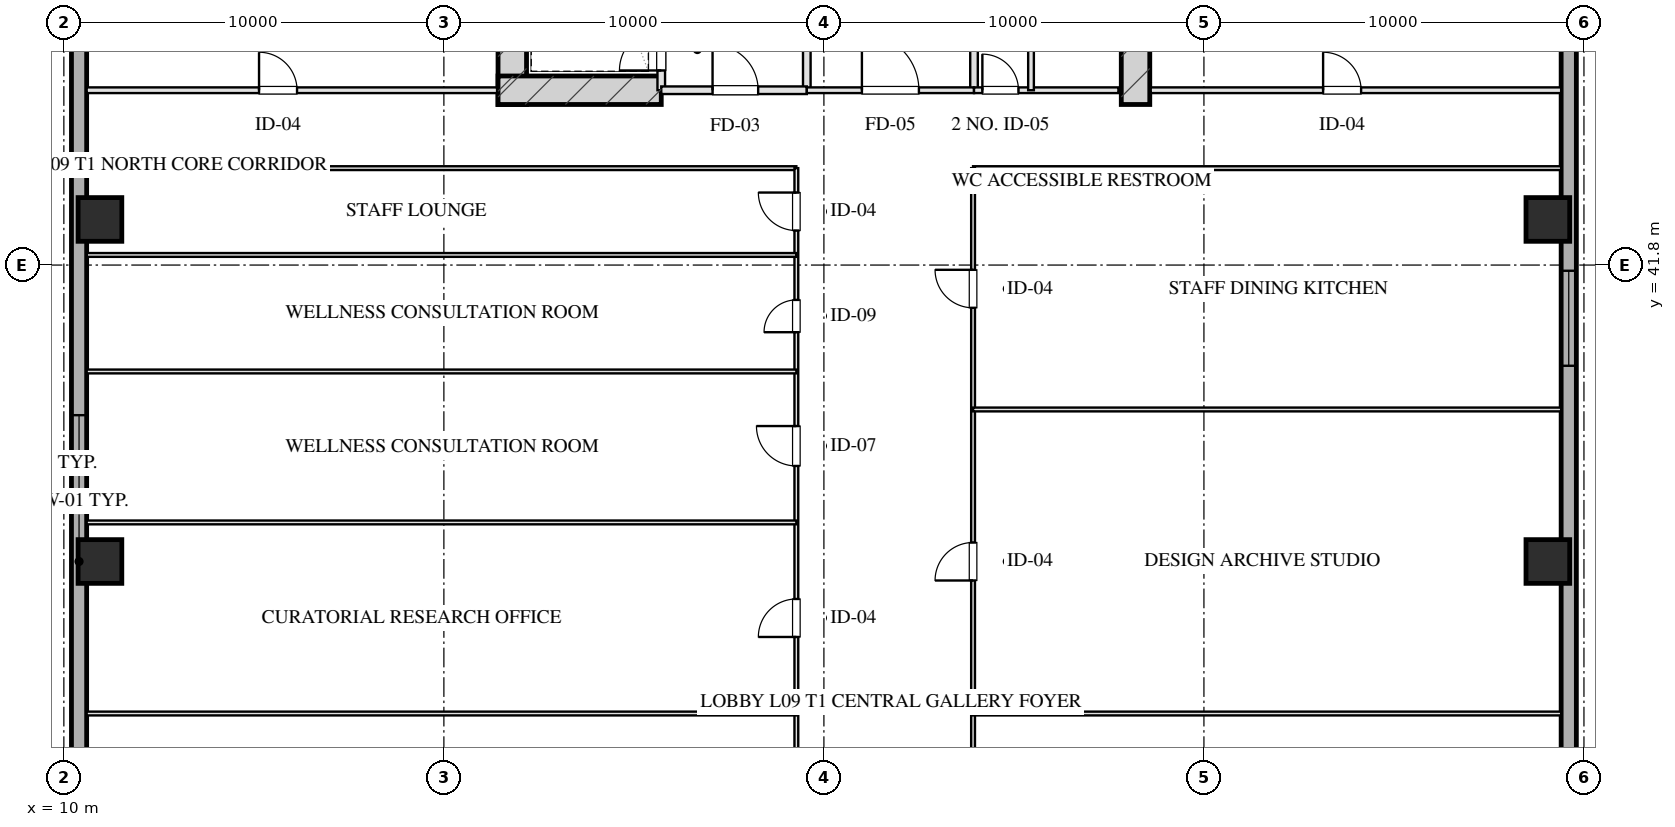
"""IFC4 building model, lengths in metres.
Left out: names, types, materials, properties, quantities, classifications, styles, units other than length and angle.
Written with IfcOpenShell. Run it as: python <this file> out.ifc"""

import sys

from ifc_helpers import new_model, si_unit, direction, frame, frame_2d, origin, origin_2d, place, context, subcontext, project, spatial, rectangle, hollow_rectangle, extrude, element, fill, save


model = new_model("IFC4")
c1 = context("Model", 3, precision=1e-05, world=origin(), true_north=direction((0.0, 1.0)))
c2 = subcontext(c1, "Body", "Model", "MODEL_VIEW")
j1 = project(units=[si_unit("LENGTHUNIT", "METRE"), si_unit("PLANEANGLEUNIT", "RADIAN")], contexts=[c1])
p1 = place(None, origin())
s1 = spatial("IfcSite", under=j1, at=p1, CompositionType="ELEMENT")
p2 = place(p1, origin())
s2 = spatial("IfcBuilding", under=s1, at=p2, CompositionType="ELEMENT")
p3 = place(p2, frame((0.0, 0.0, 42.0)))
s3 = spatial("IfcBuildingStorey", under=s2, at=p3, CompositionType="ELEMENT", Elevation=42.0)
for number, where, z_axis, x_axis in (
    (1, (21.8, 46.025, 0.0), (0.0, 0.0, 1.0), (0.0, 1.0, 0.0)),
    (2, (38.2, 46.025, 0.0), (0.0, 0.0, 1.0), (0.0, 1.0, 0.0)),
):
    element("IfcWall", number, at=place(p3, frame(where, z_axis=z_axis, x_axis=x_axis)), inside=s3, PredefinedType="SHEAR", context=c2, shape_type="SweptSolid", body=[
        extrude(rectangle(XDim=9.63, YDim=0.75, at=frame_2d((4.815, 0.0))), origin(), (0.0, 0.0, 1.0), 4.0),
    ])
p4 = place(p3, frame((21.425, 46.4, 0.0), z_axis=(0.0, 0.0, 1.0), x_axis=(1.0, 0.0, 0.0)))
e3 = element("IfcWall", 3, at=p4, inside=s3, PredefinedType="SHEAR", context=c2, shape_type="SweptSolid", body=[
    extrude(rectangle(XDim=4.295, YDim=0.75, at=frame_2d((2.147, 0.0))), origin(), (0.0, 0.0, 1.0), 4.0),
])
for number, where, z_axis, x_axis in (
    (4, (10.95, 34.0, 0.0), (0.0, 0.0, 1.0), (1.0, 0.0, 0.0)),
    (5, (10.95, 43.0, 0.0), (0.0, 0.0, 1.0), (1.0, 0.0, 0.0)),
    (6, (49.05, 34.0, 0.0), (0.0, 0.0, 1.0), (1.0, 0.0, 0.0)),
    (7, (49.05, 43.0, 0.0), (0.0, 0.0, 1.0), (1.0, 0.0, 0.0)),
):
    element("IfcColumn", number, at=place(p3, frame(where, z_axis=z_axis, x_axis=x_axis)), inside=s3, PredefinedType="COLUMN", context=c2, shape_type="SweptSolid", body=[
        extrude(hollow_rectangle(XDim=1.15, YDim=1.15, WallThickness=0.04, at=origin_2d()), origin(), (0.0, 0.0, 1.0), 4.001),
    ])
p5 = place(p3, frame((10.4, 7.2, 0.0), z_axis=(0.0, 0.0, 1.0), x_axis=(0.0, 1.0, 0.0)))
e8 = element("IfcWall", 8, at=p5, inside=s3, PredefinedType="SOLIDWALL", context=c2, shape_type="SweptSolid", body=[
    extrude(rectangle(XDim=53.6, YDim=0.4, at=frame_2d((26.8, 0.0))), origin(), (0.0, 0.0, 1.0), 3.1),
])
p6 = place(p5, frame((28.15, 0.0, 0.75)))
e9 = element("IfcOpeningElement", 9, at=p6, cuts=e8, PredefinedType="OPENING", context=c2, shape_type="SweptSolid", body=[
    extrude(rectangle(XDim=2.5, YDim=1.75, at=frame_2d((1.25, 0.875))), frame((0.0, 0.21, 0.0), z_axis=(0.0, -1.0, 0.0), x_axis=(1.0, 0.0, 0.0)), (0.0, 0.0, 1.0), 0.42),
])
p7 = place(p3, frame((49.6, 60.8, 0.0), z_axis=(0.0, 0.0, 1.0), x_axis=(0.0, -1.0, 0.0)))
e10 = element("IfcWall", 10, at=p7, inside=s3, PredefinedType="SOLIDWALL", context=c2, shape_type="SweptSolid", body=[
    extrude(rectangle(XDim=53.6, YDim=0.4, at=frame_2d((26.8, 0.0))), origin(), (0.0, 0.0, 1.0), 3.1),
])
p8 = place(p7, frame((31.95, 0.0, 0.75)))
e11 = element("IfcOpeningElement", 11, at=p8, cuts=e10, PredefinedType="OPENING", context=c2, shape_type="SweptSolid", body=[
    extrude(rectangle(XDim=2.5, YDim=1.75, at=frame_2d((1.25, 0.875))), frame((0.0, 0.21, 0.0), z_axis=(0.0, -1.0, 0.0), x_axis=(1.0, 0.0, 0.0)), (0.0, 0.0, 1.0), 0.42),
])
p9 = place(p7, frame((19.15, 0.0, 0.75)))
e12 = element("IfcOpeningElement", 12, at=p9, cuts=e10, PredefinedType="OPENING", context=c2, shape_type="SweptSolid", body=[
    extrude(rectangle(XDim=2.5, YDim=1.75, at=frame_2d((1.25, 0.875))), frame((0.0, 0.21, 0.0), z_axis=(0.0, -1.0, 0.0), x_axis=(1.0, 0.0, 0.0)), (0.0, 0.0, 1.0), 0.42),
])
p10 = place(p3, frame((25.72, 46.4, 0.0), z_axis=(0.0, 0.0, 1.0), x_axis=(0.0, 1.0, 0.0)))
e13 = element("IfcWall", 13, at=p10, inside=s3, PredefinedType="PARTITIONING", context=c2, shape_type="SweptSolid", body=[
    extrude(rectangle(XDim=1.9, YDim=0.2, at=frame_2d((0.95, 0.0))), origin(), (0.0, 0.0, 1.0), 3.705),
])
p11 = place(p10, frame((0.52, 0.0, 0.0)))
e14 = element("IfcOpeningElement", 14, at=p11, cuts=e13, PredefinedType="OPENING", context=c2, shape_type="SweptSolid", body=[
    extrude(rectangle(XDim=1.1, YDim=2.05, at=frame_2d((0.55, 1.025))), frame((0.0, 0.11, 0.0), z_axis=(0.0, -1.0, 0.0), x_axis=(1.0, 0.0, 0.0)), (0.0, 0.0, 1.0), 0.22),
])
p12 = place(p3, frame((29.55, 46.4, 0.0), z_axis=(0.0, 0.0, 1.0), x_axis=(0.0, 1.0, 0.0)))
e15 = element("IfcWall", 15, at=p12, inside=s3, PredefinedType="PARTITIONING", context=c2, shape_type="SweptSolid", body=[
    extrude(rectangle(XDim=8.43, YDim=0.2, at=frame_2d((4.215, 0.0))), origin(), (0.0, 0.0, 1.0), 3.705),
])
p13 = place(p3, frame((25.72, 46.4, 0.0), z_axis=(0.0, 0.0, 1.0), x_axis=(1.0, 0.0, 0.0)))
e16 = element("IfcWall", 16, at=p13, inside=s3, PredefinedType="PARTITIONING", context=c2, shape_type="SweptSolid", body=[
    extrude(rectangle(XDim=3.83, YDim=0.2, at=frame_2d((1.915, 0.0))), origin(), (0.0, 0.0, 1.0), 3.705),
])
p14 = place(p13, frame((1.35, 0.0, 0.0)))
e17 = element("IfcOpeningElement", 17, at=p14, cuts=e16, PredefinedType="OPENING", context=c2, shape_type="SweptSolid", body=[
    extrude(rectangle(XDim=1.2, YDim=2.05, at=frame_2d((0.6, 1.025))), frame((0.0, 0.11, 0.0), z_axis=(0.0, -1.0, 0.0), x_axis=(1.0, 0.0, 0.0)), (0.0, 0.0, 1.0), 0.22),
])
p15 = place(p3, frame((33.95, 46.4, 0.0), z_axis=(0.0, 0.0, 1.0), x_axis=(0.0, 1.0, 0.0)))
e18 = element("IfcWall", 18, at=p15, inside=s3, PredefinedType="PARTITIONING", context=c2, shape_type="SweptSolid", body=[
    extrude(rectangle(XDim=8.43, YDim=0.2, at=frame_2d((4.215, 0.0))), origin(), (0.0, 0.0, 1.0), 3.705),
])
p16 = place(p3, frame((29.55, 46.4, 0.0), z_axis=(0.0, 0.0, 1.0), x_axis=(1.0, 0.0, 0.0)))
e19 = element("IfcWall", 19, at=p16, inside=s3, PredefinedType="PARTITIONING", context=c2, shape_type="SweptSolid", body=[
    extrude(rectangle(XDim=4.4, YDim=0.15, at=frame_2d((2.2, 0.0))), origin(), (0.0, 0.0, 1.0), 3.705),
])
p17 = place(p16, frame((1.45, 0.0, 0.0)))
e20 = element("IfcOpeningElement", 20, at=p17, cuts=e19, PredefinedType="OPENING", context=c2, shape_type="SweptSolid", body=[
    extrude(rectangle(XDim=1.5, YDim=2.05, at=frame_2d((0.75, 1.025))), frame((0.0, 0.085, 0.0), z_axis=(0.0, -1.0, 0.0), x_axis=(1.0, 0.0, 0.0)), (0.0, 0.0, 1.0), 0.17),
])
p18 = place(p3, frame((33.95, 46.4, 0.0), z_axis=(0.0, 0.0, 1.0), x_axis=(1.0, 0.0, 0.0)))
e21 = element("IfcWall", 21, at=p18, inside=s3, PredefinedType="PARTITIONING", context=c2, shape_type="SweptSolid", body=[
    extrude(rectangle(XDim=3.8, YDim=0.15, at=frame_2d((1.9, 0.0))), origin(), (0.0, 0.0, 1.0), 3.705),
])
p19 = place(p18, frame((0.22, 0.0, 0.0)))
e22 = element("IfcOpeningElement", 22, at=p19, cuts=e21, PredefinedType="OPENING", context=c2, shape_type="SweptSolid", body=[
    extrude(rectangle(XDim=0.95, YDim=2.05, at=frame_2d((0.475, 1.025))), frame((0.0, 0.085, 0.0), z_axis=(0.0, -1.0, 0.0), x_axis=(1.0, 0.0, 0.0)), (0.0, 0.0, 1.0), 0.17),
])
p20 = place(p3, frame((35.45, 46.4, 0.0), z_axis=(0.0, 0.0, 1.0), x_axis=(0.0, 1.0, 0.0)))
e23 = element("IfcWall", 23, at=p20, inside=s3, PredefinedType="PARTITIONING", context=c2, shape_type="SweptSolid", body=[
    extrude(rectangle(XDim=8.43, YDim=0.15, at=frame_2d((4.215, 0.0))), origin(), (0.0, 0.0, 1.0), 3.345),
])
p21 = place(p20, frame((2.55, 0.0, 0.0)))
e24 = element("IfcOpeningElement", 24, at=p21, cuts=e23, PredefinedType="OPENING", context=c2, shape_type="SweptSolid", body=[
    extrude(rectangle(XDim=0.95, YDim=2.05, at=frame_2d((0.475, 1.025))), frame((0.0, 0.085, 0.0), z_axis=(0.0, -1.0, 0.0), x_axis=(1.0, 0.0, 0.0)), (0.0, 0.0, 1.0), 0.17),
])
p22 = place(p20, frame((5.8, 0.0, 0.0)))
e25 = element("IfcOpeningElement", 25, at=p22, cuts=e23, PredefinedType="OPENING", context=c2, shape_type="SweptSolid", body=[
    extrude(rectangle(XDim=0.9, YDim=2.05, at=frame_2d((0.45, 1.025))), frame((0.0, 0.085, 0.0), z_axis=(0.0, -1.0, 0.0), x_axis=(1.0, 0.0, 0.0)), (0.0, 0.0, 1.0), 0.17),
])
p23 = place(p3, frame((10.6, 46.4, 0.0), z_axis=(0.0, 0.0, 1.0), x_axis=(1.0, 0.0, 0.0)))
e26 = element("IfcWall", 26, at=p23, inside=s3, PredefinedType="PARTITIONING", context=c2, shape_type="SweptSolid", body=[
    extrude(rectangle(XDim=10.8, YDim=0.15, at=frame_2d((5.4, 0.0))), origin(), (0.0, 0.0, 1.0), 3.705),
])
p24 = place(p23, frame((4.536, 0.0, 0.0)))
e27 = element("IfcOpeningElement", 27, at=p24, cuts=e26, PredefinedType="OPENING", context=c2, shape_type="SweptSolid", body=[
    extrude(rectangle(XDim=1.0, YDim=2.05, at=frame_2d((0.5, 1.025))), frame((0.0, 0.085, 0.0), z_axis=(0.0, -1.0, 0.0), x_axis=(1.0, 0.0, 0.0)), (0.0, 0.0, 1.0), 0.17),
])
p25 = place(p3, frame((38.6, 46.4, 0.0), z_axis=(0.0, 0.0, 1.0), x_axis=(1.0, 0.0, 0.0)))
e28 = element("IfcWall", 28, at=p25, inside=s3, PredefinedType="PARTITIONING", context=c2, shape_type="SweptSolid", body=[
    extrude(rectangle(XDim=10.8, YDim=0.15, at=frame_2d((5.4, 0.0))), origin(), (0.0, 0.0, 1.0), 3.705),
])
p26 = place(p25, frame((4.536, 0.0, 0.0)))
e29 = element("IfcOpeningElement", 29, at=p26, cuts=e28, PredefinedType="OPENING", context=c2, shape_type="SweptSolid", body=[
    extrude(rectangle(XDim=1.0, YDim=2.05, at=frame_2d((0.5, 1.025))), frame((0.0, 0.085, 0.0), z_axis=(0.0, -1.0, 0.0), x_axis=(1.0, 0.0, 0.0)), (0.0, 0.0, 1.0), 0.17),
])
p27 = place(p3, frame((10.6, 44.35, 0.0), z_axis=(0.0, 0.0, 1.0), x_axis=(1.0, 0.0, 0.0)))
e30 = element("IfcWall", 30, at=p27, inside=s3, PredefinedType="MOVABLE", context=c2, shape_type="SweptSolid", body=[
    extrude(rectangle(XDim=18.675, YDim=0.1, at=frame_2d((9.337, 0.0))), origin(), (0.0, 0.0, 1.0), 3.705),
])
p28 = place(p3, frame((33.925, 44.35, 0.0), z_axis=(0.0, 0.0, 1.0), x_axis=(1.0, 0.0, 0.0)))
e31 = element("IfcWall", 31, at=p28, inside=s3, PredefinedType="MOVABLE", context=c2, shape_type="SweptSolid", body=[
    extrude(rectangle(XDim=15.475, YDim=0.1, at=frame_2d((7.737, 0.0))), origin(), (0.0, 0.0, 1.0), 3.705),
])
p29 = place(p3, frame((29.275, 23.65, 0.0), z_axis=(0.0, 0.0, 1.0), x_axis=(0.0, 1.0, 0.0)))
e32 = element("IfcWall", 32, at=p29, inside=s3, PredefinedType="MOVABLE", context=c2, shape_type="SweptSolid", body=[
    extrude(rectangle(XDim=20.7, YDim=0.1, at=frame_2d((10.35, 0.0))), origin(), (0.0, 0.0, 1.0), 3.705),
])
p30 = place(p29, frame((0.775, 0.0, 0.0)))
e33 = element("IfcOpeningElement", 33, at=p30, cuts=e32, PredefinedType="OPENING", context=c2, shape_type="SweptSolid", body=[
    extrude(rectangle(XDim=1.0, YDim=2.05, at=frame_2d((0.5, 1.025))), frame((0.0, 0.06, 0.0), z_axis=(0.0, -1.0, 0.0), x_axis=(1.0, 0.0, 0.0)), (0.0, 0.0, 1.0), 0.12),
])
p31 = place(p29, frame((3.95, 0.0, 0.0)))
e34 = element("IfcOpeningElement", 34, at=p31, cuts=e32, PredefinedType="OPENING", context=c2, shape_type="SweptSolid", body=[
    extrude(rectangle(XDim=1.0, YDim=2.05, at=frame_2d((0.5, 1.025))), frame((0.0, 0.06, 0.0), z_axis=(0.0, -1.0, 0.0), x_axis=(1.0, 0.0, 0.0)), (0.0, 0.0, 1.0), 0.12),
])
p32 = place(p29, frame((8.364, 0.0, 0.0)))
e35 = element("IfcOpeningElement", 35, at=p32, cuts=e32, PredefinedType="OPENING", context=c2, shape_type="SweptSolid", body=[
    extrude(rectangle(XDim=1.0, YDim=2.05, at=frame_2d((0.5, 1.025))), frame((0.0, 0.06, 0.0), z_axis=(0.0, -1.0, 0.0), x_axis=(1.0, 0.0, 0.0)), (0.0, 0.0, 1.0), 0.12),
])
p33 = place(p29, frame((12.864, 0.0, 0.0)))
e36 = element("IfcOpeningElement", 36, at=p33, cuts=e32, PredefinedType="OPENING", context=c2, shape_type="SweptSolid", body=[
    extrude(rectangle(XDim=1.05, YDim=2.05, at=frame_2d((0.525, 1.025))), frame((0.0, 0.06, 0.0), z_axis=(0.0, -1.0, 0.0), x_axis=(1.0, 0.0, 0.0)), (0.0, 0.0, 1.0), 0.12),
])
p34 = place(p29, frame((16.383, 0.0, 0.0)))
e37 = element("IfcOpeningElement", 37, at=p34, cuts=e32, PredefinedType="OPENING", context=c2, shape_type="SweptSolid", body=[
    extrude(rectangle(XDim=0.85, YDim=2.05, at=frame_2d((0.425, 1.025))), frame((0.0, 0.06, 0.0), z_axis=(0.0, -1.0, 0.0), x_axis=(1.0, 0.0, 0.0)), (0.0, 0.0, 1.0), 0.12),
])
p35 = place(p29, frame((19.058, 0.0, 0.0)))
e38 = element("IfcOpeningElement", 38, at=p35, cuts=e32, PredefinedType="OPENING", context=c2, shape_type="SweptSolid", body=[
    extrude(rectangle(XDim=1.0, YDim=2.05, at=frame_2d((0.5, 1.025))), frame((0.0, 0.06, 0.0), z_axis=(0.0, -1.0, 0.0), x_axis=(1.0, 0.0, 0.0)), (0.0, 0.0, 1.0), 0.12),
])
p36 = place(p3, frame((33.925, 23.65, 0.0), z_axis=(0.0, 0.0, 1.0), x_axis=(0.0, 1.0, 0.0)))
e39 = element("IfcWall", 39, at=p36, inside=s3, PredefinedType="MOVABLE", context=c2, shape_type="SweptSolid", body=[
    extrude(rectangle(XDim=20.7, YDim=0.1, at=frame_2d((10.35, 0.0))), origin(), (0.0, 0.0, 1.0), 3.705),
])
p37 = place(p36, frame((2.675, 0.0, 0.0)))
e40 = element("IfcOpeningElement", 40, at=p37, cuts=e39, PredefinedType="OPENING", context=c2, shape_type="SweptSolid", body=[
    extrude(rectangle(XDim=1.0, YDim=2.05, at=frame_2d((0.5, 1.025))), frame((0.0, 0.06, 0.0), z_axis=(0.0, -1.0, 0.0), x_axis=(1.0, 0.0, 0.0)), (0.0, 0.0, 1.0), 0.12),
])
p38 = place(p36, frame((9.85, 0.0, 0.0)))
e41 = element("IfcOpeningElement", 41, at=p38, cuts=e39, PredefinedType="OPENING", context=c2, shape_type="SweptSolid", body=[
    extrude(rectangle(XDim=1.0, YDim=2.05, at=frame_2d((0.5, 1.025))), frame((0.0, 0.06, 0.0), z_axis=(0.0, -1.0, 0.0), x_axis=(1.0, 0.0, 0.0)), (0.0, 0.0, 1.0), 0.12),
])
p39 = place(p36, frame((17.025, 0.0, 0.0)))
e42 = element("IfcOpeningElement", 42, at=p39, cuts=e39, PredefinedType="OPENING", context=c2, shape_type="SweptSolid", body=[
    extrude(rectangle(XDim=1.0, YDim=2.05, at=frame_2d((0.5, 1.025))), frame((0.0, 0.06, 0.0), z_axis=(0.0, -1.0, 0.0), x_axis=(1.0, 0.0, 0.0)), (0.0, 0.0, 1.0), 0.12),
])
for number, where, z_axis, x_axis in (
    (43, (10.6, 30.0, 0.0), (0.0, 0.0, 1.0), (1.0, 0.0, 0.0)),
    (44, (10.6, 35.028, 0.0), (0.0, 0.0, 1.0), (1.0, 0.0, 0.0)),
    (45, (10.6, 39.0, 0.0), (0.0, 0.0, 1.0), (1.0, 0.0, 0.0)),
    (46, (10.6, 42.066, 0.0), (0.0, 0.0, 1.0), (1.0, 0.0, 0.0)),
):
    element("IfcWall", number, at=place(p3, frame(where, z_axis=z_axis, x_axis=x_axis)), inside=s3, PredefinedType="MOVABLE", context=c2, shape_type="SweptSolid", body=[
        extrude(rectangle(XDim=18.675, YDim=0.1, at=frame_2d((9.337, 0.0))), origin(), (0.0, 0.0, 1.0), 3.705),
    ])
for number, where, z_axis, x_axis in (
    (47, (33.925, 30.0, 0.0), (0.0, 0.0, 1.0), (1.0, 0.0, 0.0)),
    (48, (33.925, 38.0, 0.0), (0.0, 0.0, 1.0), (1.0, 0.0, 0.0)),
):
    element("IfcWall", number, at=place(p3, frame(where, z_axis=z_axis, x_axis=x_axis)), inside=s3, PredefinedType="MOVABLE", context=c2, shape_type="SweptSolid", body=[
        extrude(rectangle(XDim=15.475, YDim=0.1, at=frame_2d((7.737, 0.0))), origin(), (0.0, 0.0, 1.0), 3.705),
    ])
p40 = place(p6, origin())
e49 = element("IfcWindow", 49, at=p40, inside=s3, PartitioningType="TRIPLE_PANEL_VERTICAL", PredefinedType="WINDOW", context=c2, shape_type="SweptSolid", body=[
    extrude(rectangle(XDim=2.5, YDim=1.75, at=frame_2d((1.25, 0.875))), frame((0.0, 0.03, 0.0), z_axis=(0.0, -1.0, 0.0), x_axis=(1.0, 0.0, 0.0)), (0.0, 0.0, 1.0), 0.06),
])
fill(e9, e49)
p41 = place(p9, origin())
e50 = element("IfcWindow", 50, at=p41, inside=s3, PartitioningType="TRIPLE_PANEL_VERTICAL", PredefinedType="WINDOW", context=c2, shape_type="SweptSolid", body=[
    extrude(rectangle(XDim=2.5, YDim=1.75, at=frame_2d((1.25, 0.875))), frame((0.0, 0.03, 0.0), z_axis=(0.0, -1.0, 0.0), x_axis=(1.0, 0.0, 0.0)), (0.0, 0.0, 1.0), 0.06),
])
fill(e12, e50)
p42 = place(p11, origin())
e51 = element("IfcDoor", 51, at=p42, inside=s3, OperationType="SINGLE_SWING_LEFT", PredefinedType="DOOR", context=c2, shape_type="SweptSolid", body=[
    extrude(rectangle(XDim=1.1, YDim=2.05, at=frame_2d((0.55, 1.025))), frame((0.0, 0.025, 0.0), z_axis=(0.0, -1.0, 0.0), x_axis=(1.0, 0.0, 0.0)), (0.0, 0.0, 1.0), 0.05),
])
fill(e14, e51)
p43 = place(p14, origin())
e52 = element("IfcDoor", 52, at=p43, inside=s3, OperationType="SINGLE_SWING_LEFT", PredefinedType="DOOR", context=c2, shape_type="SweptSolid", body=[
    extrude(rectangle(XDim=1.2, YDim=2.05, at=frame_2d((0.6, 1.025))), frame((0.0, 0.025, 0.0), z_axis=(0.0, -1.0, 0.0), x_axis=(1.0, 0.0, 0.0)), (0.0, 0.0, 1.0), 0.05),
])
fill(e17, e52)
p44 = place(p17, origin())
e53 = element("IfcDoor", 53, at=p44, inside=s3, OperationType="SINGLE_SWING_LEFT", PredefinedType="DOOR", context=c2, shape_type="SweptSolid", body=[
    extrude(rectangle(XDim=1.5, YDim=2.05, at=frame_2d((0.75, 1.025))), frame((0.0, 0.025, 0.0), z_axis=(0.0, -1.0, 0.0), x_axis=(1.0, 0.0, 0.0)), (0.0, 0.0, 1.0), 0.05),
])
fill(e20, e53)
p45 = place(p19, origin())
e54 = element("IfcDoor", 54, at=p45, inside=s3, OperationType="SINGLE_SWING_LEFT", PredefinedType="DOOR", context=c2, shape_type="SweptSolid", body=[
    extrude(rectangle(XDim=0.95, YDim=2.05, at=frame_2d((0.475, 1.025))), frame((0.0, 0.025, 0.0), z_axis=(0.0, -1.0, 0.0), x_axis=(1.0, 0.0, 0.0)), (0.0, 0.0, 1.0), 0.05),
])
fill(e22, e54)
p46 = place(p24, origin())
e55 = element("IfcDoor", 55, at=p46, inside=s3, OperationType="SINGLE_SWING_LEFT", PredefinedType="DOOR", context=c2, shape_type="SweptSolid", body=[
    extrude(rectangle(XDim=1.0, YDim=2.05, at=frame_2d((0.5, 1.025))), frame((0.0, 0.025, 0.0), z_axis=(0.0, -1.0, 0.0), x_axis=(1.0, 0.0, 0.0)), (0.0, 0.0, 1.0), 0.05),
])
fill(e27, e55)
p47 = place(p26, origin())
e56 = element("IfcDoor", 56, at=p47, inside=s3, OperationType="SINGLE_SWING_LEFT", PredefinedType="DOOR", context=c2, shape_type="SweptSolid", body=[
    extrude(rectangle(XDim=1.0, YDim=2.05, at=frame_2d((0.5, 1.025))), frame((0.0, 0.025, 0.0), z_axis=(0.0, -1.0, 0.0), x_axis=(1.0, 0.0, 0.0)), (0.0, 0.0, 1.0), 0.05),
])
fill(e29, e56)
p48 = place(p32, origin())
e57 = element("IfcDoor", 57, at=p48, inside=s3, OperationType="SINGLE_SWING_LEFT", PredefinedType="DOOR", context=c2, shape_type="SweptSolid", body=[
    extrude(rectangle(XDim=1.0, YDim=2.05, at=frame_2d((0.5, 1.025))), frame((0.0, 0.025, 0.0), z_axis=(0.0, -1.0, 0.0), x_axis=(1.0, 0.0, 0.0)), (0.0, 0.0, 1.0), 0.05),
])
fill(e35, e57)
p49 = place(p33, origin())
e58 = element("IfcDoor", 58, at=p49, inside=s3, OperationType="SINGLE_SWING_RIGHT", PredefinedType="DOOR", context=c2, shape_type="SweptSolid", body=[
    extrude(rectangle(XDim=1.05, YDim=2.05, at=frame_2d((0.525, 1.025))), frame((0.0, 0.025, 0.0), z_axis=(0.0, -1.0, 0.0), x_axis=(1.0, 0.0, 0.0)), (0.0, 0.0, 1.0), 0.05),
])
fill(e36, e58)
p50 = place(p34, origin())
e59 = element("IfcDoor", 59, at=p50, inside=s3, OperationType="SINGLE_SWING_LEFT", PredefinedType="DOOR", context=c2, shape_type="SweptSolid", body=[
    extrude(rectangle(XDim=0.85, YDim=2.05, at=frame_2d((0.425, 1.025))), frame((0.0, 0.025, 0.0), z_axis=(0.0, -1.0, 0.0), x_axis=(1.0, 0.0, 0.0)), (0.0, 0.0, 1.0), 0.05),
])
fill(e37, e59)
p51 = place(p35, origin())
e60 = element("IfcDoor", 60, at=p51, inside=s3, OperationType="SINGLE_SWING_RIGHT", PredefinedType="DOOR", context=c2, shape_type="SweptSolid", body=[
    extrude(rectangle(XDim=1.0, YDim=2.05, at=frame_2d((0.5, 1.025))), frame((0.0, 0.025, 0.0), z_axis=(0.0, -1.0, 0.0), x_axis=(1.0, 0.0, 0.0)), (0.0, 0.0, 1.0), 0.05),
])
fill(e38, e60)
p52 = place(p38, origin())
e61 = element("IfcDoor", 61, at=p52, inside=s3, OperationType="SINGLE_SWING_LEFT", PredefinedType="DOOR", context=c2, shape_type="SweptSolid", body=[
    extrude(rectangle(XDim=1.0, YDim=2.05, at=frame_2d((0.5, 1.025))), frame((0.0, 0.025, 0.0), z_axis=(0.0, -1.0, 0.0), x_axis=(1.0, 0.0, 0.0)), (0.0, 0.0, 1.0), 0.05),
])
fill(e41, e61)
p53 = place(p39, origin())
e62 = element("IfcDoor", 62, at=p53, inside=s3, OperationType="SINGLE_SWING_RIGHT", PredefinedType="DOOR", context=c2, shape_type="SweptSolid", body=[
    extrude(rectangle(XDim=1.0, YDim=2.05, at=frame_2d((0.5, 1.025))), frame((0.0, 0.025, 0.0), z_axis=(0.0, -1.0, 0.0), x_axis=(1.0, 0.0, 0.0)), (0.0, 0.0, 1.0), 0.05),
])
fill(e42, e62)
save(model, sys.argv[1])
